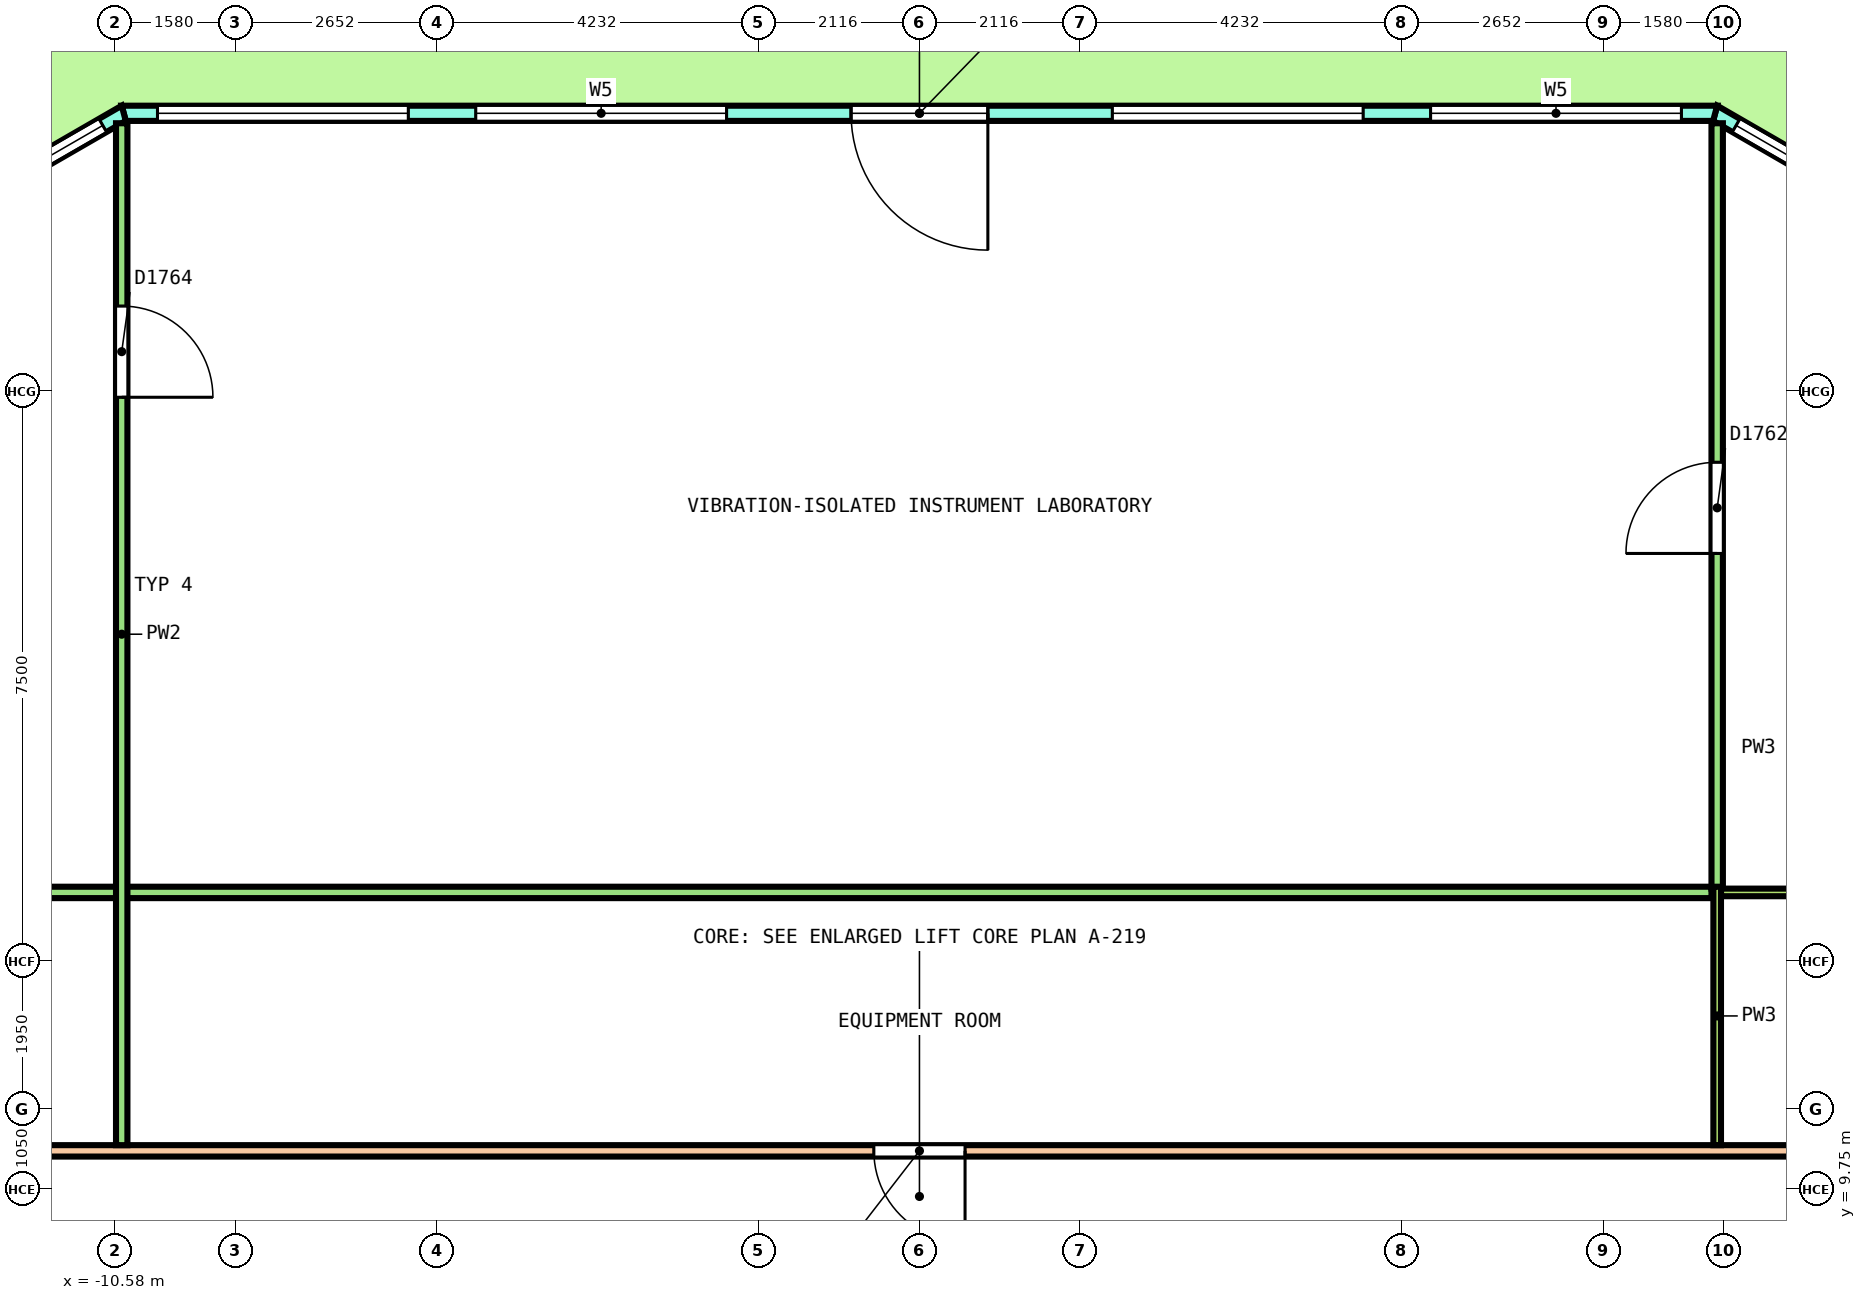
"""IFC4 building model, lengths in metres.
Left out: names, types, materials, properties, quantities, classifications, styles, units other than length and angle.
Written with IfcOpenShell. Run it as: python <this file> out.ifc"""

import sys

from ifc_helpers import new_model, si_unit, direction, frame, frame_2d, origin, place, context, subcontext, project, spatial, polyline, rectangle, outline, extrude, element, fill, save


model = new_model("IFC4")
c1 = context("Model", 3, precision=1e-05, world=origin(), true_north=direction((0.0, 1.0)))
c2 = subcontext(c1, "Body", "Model", "MODEL_VIEW")
j1 = project(units=[si_unit("LENGTHUNIT", "METRE"), si_unit("PLANEANGLEUNIT", "RADIAN")], contexts=[c1])
p1 = place(None, origin())
s1 = spatial("IfcSite", under=j1, at=p1, CompositionType="ELEMENT")
p2 = place(p1, origin())
s2 = spatial("IfcBuilding", under=s1, at=p2, CompositionType="ELEMENT")
p3 = place(p2, frame((0.0, 0.0, 162.8)))
s3 = spatial("IfcBuildingStorey", under=s2, at=p3, CompositionType="ELEMENT", Elevation=162.8)
p4 = place(p3, frame((16.422, 20.463, 0.0), z_axis=(0.0, 0.0, 1.0), x_axis=(-0.866029458321, 0.49999297727, 0.0)))
e1 = element("IfcWall", 1, at=p4, inside=s3, PredefinedType="SOLIDWALL", context=c2, shape_type="SweptSolid", body=[
    extrude(outline(polyline([(-0.027, -0.1), (1.128, -0.1), (2.282, -0.1), (3.437, -0.1), (4.592, -0.1), (5.747, -0.1), (6.901, -0.1), (6.848, 0.1), (5.711, 0.1), (4.574, 0.1), (3.437, 0.1), (2.301, 0.1), (1.164, 0.1), (0.027, 0.1), (-0.027, -0.1)])), origin(), (0.0, 0.0, 1.0), 4.1),
])
p5 = place(p4, frame((0.319, 0.0, 0.1)))
e2 = element("IfcOpeningElement", 2, at=p5, cuts=e1, PredefinedType="OPENING", context=c2, shape_type="SweptSolid", body=[
    extrude(rectangle(XDim=2.8, YDim=2.9, at=frame_2d((1.4, 1.45))), frame((0.0, 0.11, 0.0), z_axis=(0.0, -1.0, 0.0), x_axis=(1.0, 0.0, 0.0)), (0.0, 0.0, 1.0), 0.22),
])
p6 = place(p4, frame((3.756, 0.0, 0.1)))
e3 = element("IfcOpeningElement", 3, at=p6, cuts=e1, PredefinedType="OPENING", context=c2, shape_type="SweptSolid", body=[
    extrude(rectangle(XDim=2.8, YDim=2.9, at=frame_2d((1.4, 1.45))), frame((0.0, 0.11, 0.0), z_axis=(0.0, -1.0, 0.0), x_axis=(1.0, 0.0, 0.0)), (0.0, 0.0, 1.0), 0.22),
])
p7 = place(p3, frame((10.468, 23.9, 0.0), z_axis=(0.0, 0.0, 1.0), x_axis=(-1.0, 0.0, 0.0)))
e4 = element("IfcWall", 4, at=p7, inside=s3, PredefinedType="SOLIDWALL", context=c2, shape_type="SweptSolid", body=[
    extrude(outline(polyline([(-0.027, -0.1), (1.023, -0.1), (2.072, -0.1), (3.122, -0.1), (4.171, -0.1), (5.221, -0.1), (6.27, -0.1), (7.32, -0.1), (8.369, -0.1), (9.419, -0.1), (10.468, -0.1), (11.518, -0.1), (12.567, -0.1), (13.617, -0.1), (14.666, -0.1), (15.716, -0.1), (16.765, -0.1), (17.815, -0.1), (18.864, -0.1), (19.914, -0.1), (20.963, -0.1), (20.91, 0.1), (19.865, 0.1), (18.821, 0.1), (17.777, 0.1), (16.733, 0.1), (15.689, 0.1), (14.645, 0.1), (13.601, 0.1), (12.557, 0.1), (11.512, 0.1), (10.468, 0.1), (9.424, 0.1), (8.38, 0.1), (7.336, 0.1), (6.292, 0.1), (5.248, 0.1), (4.203, 0.1), (3.159, 0.1), (2.115, 0.1), (1.071, 0.1), (0.027, 0.1), (-0.027, -0.1)])), origin(), (0.0, 0.0, 1.0), 4.1),
])
p8 = place(p7, frame((0.444, 0.0, 0.1)))
e5 = element("IfcOpeningElement", 5, at=p8, cuts=e4, PredefinedType="OPENING", context=c2, shape_type="SweptSolid", body=[
    extrude(rectangle(XDim=3.3, YDim=2.9, at=frame_2d((1.65, 1.45))), frame((0.0, 0.11, 0.0), z_axis=(0.0, -1.0, 0.0), x_axis=(1.0, 0.0, 0.0)), (0.0, 0.0, 1.0), 0.22),
])
p9 = place(p7, frame((4.631, 0.0, 0.1)))
e6 = element("IfcOpeningElement", 6, at=p9, cuts=e4, PredefinedType="OPENING", context=c2, shape_type="SweptSolid", body=[
    extrude(rectangle(XDim=3.3, YDim=2.9, at=frame_2d((1.65, 1.45))), frame((0.0, 0.11, 0.0), z_axis=(0.0, -1.0, 0.0), x_axis=(1.0, 0.0, 0.0)), (0.0, 0.0, 1.0), 0.22),
])
p10 = place(p7, frame((9.568, 0.0, 0.0)))
e7 = element("IfcOpeningElement", 7, at=p10, cuts=e4, PredefinedType="OPENING", context=c2, shape_type="SweptSolid", body=[
    extrude(rectangle(XDim=1.8, YDim=2.4, at=frame_2d((0.9, 1.2))), frame((0.0, 0.11, 0.0), z_axis=(0.0, -1.0, 0.0), x_axis=(1.0, 0.0, 0.0)), (0.0, 0.0, 1.0), 0.22),
])
p11 = place(p7, frame((9.568, 0.0, 2.55)))
e8 = element("IfcOpeningElement", 8, at=p11, cuts=e4, PredefinedType="OPENING", context=c2, shape_type="SweptSolid", body=[
    extrude(rectangle(XDim=1.8, YDim=0.45, at=frame_2d((0.9, 0.225))), frame((0.0, 0.11, 0.0), z_axis=(0.0, -1.0, 0.0), x_axis=(1.0, 0.0, 0.0)), (0.0, 0.0, 1.0), 0.22),
])
p12 = place(p7, frame((13.006, 0.0, 0.1)))
e9 = element("IfcOpeningElement", 9, at=p12, cuts=e4, PredefinedType="OPENING", context=c2, shape_type="SweptSolid", body=[
    extrude(rectangle(XDim=3.3, YDim=2.9, at=frame_2d((1.65, 1.45))), frame((0.0, 0.11, 0.0), z_axis=(0.0, -1.0, 0.0), x_axis=(1.0, 0.0, 0.0)), (0.0, 0.0, 1.0), 0.22),
])
p13 = place(p7, frame((17.193, 0.0, 0.1)))
e10 = element("IfcOpeningElement", 10, at=p13, cuts=e4, PredefinedType="OPENING", context=c2, shape_type="SweptSolid", body=[
    extrude(rectangle(XDim=3.3, YDim=2.9, at=frame_2d((1.65, 1.45))), frame((0.0, 0.11, 0.0), z_axis=(0.0, -1.0, 0.0), x_axis=(1.0, 0.0, 0.0)), (0.0, 0.0, 1.0), 0.22),
])
p14 = place(p3, frame((-10.468, 23.9, 0.0), z_axis=(0.0, 0.0, 1.0), x_axis=(-0.866029458321, -0.49999297727, 0.0)))
e11 = element("IfcWall", 11, at=p14, inside=s3, PredefinedType="SOLIDWALL", context=c2, shape_type="SweptSolid", body=[
    extrude(outline(polyline([(-0.027, -0.1), (1.128, -0.1), (2.282, -0.1), (3.437, -0.1), (4.592, -0.1), (5.747, -0.1), (6.901, -0.1), (6.848, 0.1), (5.711, 0.1), (4.574, 0.1), (3.437, 0.1), (2.301, 0.1), (1.164, 0.1), (0.027, 0.1), (-0.027, -0.1)])), origin(), (0.0, 0.0, 1.0), 4.1),
])
p15 = place(p14, frame((0.319, 0.0, 0.1)))
e12 = element("IfcOpeningElement", 12, at=p15, cuts=e11, PredefinedType="OPENING", context=c2, shape_type="SweptSolid", body=[
    extrude(rectangle(XDim=2.8, YDim=2.9, at=frame_2d((1.4, 1.45))), frame((0.0, 0.11, 0.0), z_axis=(0.0, -1.0, 0.0), x_axis=(1.0, 0.0, 0.0)), (0.0, 0.0, 1.0), 0.22),
])
p16 = place(p14, frame((3.756, 0.0, 0.1)))
e13 = element("IfcOpeningElement", 13, at=p16, cuts=e11, PredefinedType="OPENING", context=c2, shape_type="SweptSolid", body=[
    extrude(rectangle(XDim=2.8, YDim=2.9, at=frame_2d((1.4, 1.45))), frame((0.0, 0.11, 0.0), z_axis=(0.0, -1.0, 0.0), x_axis=(1.0, 0.0, 0.0)), (0.0, 0.0, 1.0), 0.22),
])
p17 = place(p3, frame((-15.275, 10.25, 0.0), z_axis=(0.0, 0.0, 1.0), x_axis=(1.0, 0.0, 0.0)))
e14 = element("IfcWall", 14, at=p17, inside=s3, PredefinedType="PARTITIONING", context=c2, shape_type="SweptSolid", body=[
    extrude(rectangle(XDim=30.55, YDim=0.15, at=frame_2d((15.275, 0.0))), origin(), (0.0, 0.0, 1.0), 3.05),
])
p18 = place(p17, frame((26.909, 0.0, 0.0)))
e15 = element("IfcOpeningElement", 15, at=p18, cuts=e14, PredefinedType="OPENING", context=c2, shape_type="SweptSolid", body=[
    extrude(rectangle(XDim=1.0, YDim=2.1, at=frame_2d((0.5, 1.05))), frame((0.0, 0.085, 0.0), z_axis=(0.0, -1.0, 0.0), x_axis=(1.0, 0.0, 0.0)), (0.0, 0.0, 1.0), 0.17),
])
p19 = place(p17, frame((14.675, 0.0, 0.0)))
e16 = element("IfcOpeningElement", 16, at=p19, cuts=e14, PredefinedType="OPENING", context=c2, shape_type="SweptSolid", body=[
    extrude(rectangle(XDim=1.2, YDim=2.1, at=frame_2d((0.6, 1.05))), frame((0.0, 0.085, 0.0), z_axis=(0.0, -1.0, 0.0), x_axis=(1.0, 0.0, 0.0)), (0.0, 0.0, 1.0), 0.17),
])
p20 = place(p17, frame((2.326, 0.0, 0.0)))
e17 = element("IfcOpeningElement", 17, at=p20, cuts=e14, PredefinedType="OPENING", context=c2, shape_type="SweptSolid", body=[
    extrude(rectangle(XDim=1.0, YDim=2.1, at=frame_2d((0.5, 1.05))), frame((0.0, 0.085, 0.0), z_axis=(0.0, -1.0, 0.0), x_axis=(1.0, 0.0, 0.0)), (0.0, 0.0, 1.0), 0.17),
])
p21 = place(p3, frame((-16.761, 13.65, 0.0), z_axis=(0.0, 0.0, 1.0), x_axis=(1.0, 0.0, 0.0)))
e18 = element("IfcWall", 18, at=p21, inside=s3, PredefinedType="PARTITIONING", context=c2, shape_type="SweptSolid", body=[
    extrude(rectangle(XDim=27.182, YDim=0.15, at=frame_2d((13.591, 0.0))), origin(), (0.0, 0.0, 1.0), 3.05),
])
p22 = place(p3, frame((10.495, 13.7, 0.0), z_axis=(0.0, 0.0, 1.0), x_axis=(0.0, 1.0, 0.0)))
e19 = element("IfcWall", 19, at=p22, inside=s3, PredefinedType="PARTITIONING", context=c2, shape_type="SweptSolid", body=[
    extrude(rectangle(XDim=10.069, YDim=0.15, at=frame_2d((5.035, 0.0))), origin(), (0.0, 0.0, 1.0), 3.05),
])
p23 = place(p22, frame((4.409, 0.0, 0.0)))
e20 = element("IfcOpeningElement", 20, at=p23, cuts=e19, PredefinedType="OPENING", context=c2, shape_type="SweptSolid", body=[
    extrude(rectangle(XDim=1.2, YDim=2.1, at=frame_2d((0.6, 1.05))), frame((0.0, 0.085, 0.0), z_axis=(0.0, -1.0, 0.0), x_axis=(1.0, 0.0, 0.0)), (0.0, 0.0, 1.0), 0.17),
])
p24 = place(p3, frame((-10.495, 10.325, 0.0), z_axis=(0.0, 0.0, 1.0), x_axis=(0.0, 1.0, 0.0)))
e21 = element("IfcWall", 21, at=p24, inside=s3, PredefinedType="PARTITIONING", context=c2, shape_type="SweptSolid", body=[
    extrude(rectangle(XDim=13.444, YDim=0.15, at=frame_2d((6.722, 0.0))), origin(), (0.0, 0.0, 1.0), 3.05),
])
p25 = place(p24, frame((9.839, 0.0, 0.0)))
e22 = element("IfcOpeningElement", 22, at=p25, cuts=e21, PredefinedType="OPENING", context=c2, shape_type="SweptSolid", body=[
    extrude(rectangle(XDim=1.2, YDim=2.1, at=frame_2d((0.6, 1.05))), frame((0.0, 0.085, 0.0), z_axis=(0.0, -1.0, 0.0), x_axis=(1.0, 0.0, 0.0)), (0.0, 0.0, 1.0), 0.17),
])
p26 = place(p3, frame((10.545, 13.65, 0.0), z_axis=(0.0, 0.0, 1.0), x_axis=(1.0, 0.0, 0.0)))
e23 = element("IfcWall", 23, at=p26, inside=s3, PredefinedType="PARTITIONING", context=c2, shape_type="SweptSolid", body=[
    extrude(rectangle(XDim=5.108, YDim=0.1, at=frame_2d((2.554, 0.0))), origin(), (0.0, 0.0, 1.0), 3.05),
])
p27 = place(p26, frame((2.597, 0.0, 0.0)))
e24 = element("IfcOpeningElement", 24, at=p27, cuts=e23, PredefinedType="OPENING", context=c2, shape_type="SweptSolid", body=[
    extrude(rectangle(XDim=1.0, YDim=2.1, at=frame_2d((0.5, 1.05))), frame((0.0, 0.06, 0.0), z_axis=(0.0, -1.0, 0.0), x_axis=(1.0, 0.0, 0.0)), (0.0, 0.0, 1.0), 0.12),
])
p28 = place(p3, frame((10.495, 10.325, 0.0), z_axis=(0.0, 0.0, 1.0), x_axis=(0.0, 1.0, 0.0)))
e25 = element("IfcWall", 25, at=p28, inside=s3, PredefinedType="PARTITIONING", context=c2, shape_type="SweptSolid", body=[
    extrude(rectangle(XDim=3.4, YDim=0.1, at=frame_2d((1.7, 0.0))), origin(), (0.0, 0.0, 1.0), 3.05),
])
p29 = place(p6, origin())
e26 = element("IfcWindow", 26, at=p29, inside=s3, PartitioningType="SINGLE_PANEL", PredefinedType="WINDOW", context=c2, shape_type="SweptSolid", body=[
    extrude(rectangle(XDim=2.8, YDim=2.9, at=frame_2d((1.4, 1.45))), frame((0.0, 0.03, 0.0), z_axis=(0.0, -1.0, 0.0), x_axis=(1.0, 0.0, 0.0)), (0.0, 0.0, 1.0), 0.06),
])
fill(e3, e26)
p30 = place(p8, origin())
e27 = element("IfcWindow", 27, at=p30, inside=s3, PartitioningType="SINGLE_PANEL", PredefinedType="WINDOW", context=c2, shape_type="SweptSolid", body=[
    extrude(rectangle(XDim=3.3, YDim=2.9, at=frame_2d((1.65, 1.45))), frame((0.0, 0.03, 0.0), z_axis=(0.0, -1.0, 0.0), x_axis=(1.0, 0.0, 0.0)), (0.0, 0.0, 1.0), 0.06),
])
fill(e5, e27)
p31 = place(p9, origin())
e28 = element("IfcWindow", 28, at=p31, inside=s3, PartitioningType="SINGLE_PANEL", PredefinedType="WINDOW", context=c2, shape_type="SweptSolid", body=[
    extrude(rectangle(XDim=3.3, YDim=2.9, at=frame_2d((1.65, 1.45))), frame((0.0, 0.03, 0.0), z_axis=(0.0, -1.0, 0.0), x_axis=(1.0, 0.0, 0.0)), (0.0, 0.0, 1.0), 0.06),
])
fill(e6, e28)
p32 = place(p10, origin())
e29 = element("IfcDoor", 29, at=p32, inside=s3, OperationType="DOUBLE_DOOR_SINGLE_SWING", PredefinedType="DOOR", context=c2, shape_type="SweptSolid", body=[
    extrude(rectangle(XDim=1.8, YDim=2.4, at=frame_2d((0.9, 1.2))), frame((0.0, 0.025, 0.0), z_axis=(0.0, -1.0, 0.0), x_axis=(1.0, 0.0, 0.0)), (0.0, 0.0, 1.0), 0.05),
])
fill(e7, e29)
p33 = place(p11, origin())
e30 = element("IfcWindow", 30, at=p33, inside=s3, PartitioningType="SINGLE_PANEL", PredefinedType="WINDOW", context=c2, shape_type="SweptSolid", body=[
    extrude(rectangle(XDim=1.8, YDim=0.45, at=frame_2d((0.9, 0.225))), frame((0.0, 0.03, 0.0), z_axis=(0.0, -1.0, 0.0), x_axis=(1.0, 0.0, 0.0)), (0.0, 0.0, 1.0), 0.06),
])
fill(e8, e30)
p34 = place(p12, origin())
e31 = element("IfcWindow", 31, at=p34, inside=s3, PartitioningType="SINGLE_PANEL", PredefinedType="WINDOW", context=c2, shape_type="SweptSolid", body=[
    extrude(rectangle(XDim=3.3, YDim=2.9, at=frame_2d((1.65, 1.45))), frame((0.0, 0.03, 0.0), z_axis=(0.0, -1.0, 0.0), x_axis=(1.0, 0.0, 0.0)), (0.0, 0.0, 1.0), 0.06),
])
fill(e9, e31)
p35 = place(p13, origin())
e32 = element("IfcWindow", 32, at=p35, inside=s3, PartitioningType="SINGLE_PANEL", PredefinedType="WINDOW", context=c2, shape_type="SweptSolid", body=[
    extrude(rectangle(XDim=3.3, YDim=2.9, at=frame_2d((1.65, 1.45))), frame((0.0, 0.03, 0.0), z_axis=(0.0, -1.0, 0.0), x_axis=(1.0, 0.0, 0.0)), (0.0, 0.0, 1.0), 0.06),
])
fill(e10, e32)
p36 = place(p15, origin())
e33 = element("IfcWindow", 33, at=p36, inside=s3, PartitioningType="SINGLE_PANEL", PredefinedType="WINDOW", context=c2, shape_type="SweptSolid", body=[
    extrude(rectangle(XDim=2.8, YDim=2.9, at=frame_2d((1.4, 1.45))), frame((0.0, 0.03, 0.0), z_axis=(0.0, -1.0, 0.0), x_axis=(1.0, 0.0, 0.0)), (0.0, 0.0, 1.0), 0.06),
])
fill(e12, e33)
p37 = place(p23, origin())
e34 = element("IfcDoor", 34, at=p37, inside=s3, OperationType="DOUBLE_DOOR_SINGLE_SWING", PredefinedType="DOOR", context=c2, shape_type="SweptSolid", body=[
    extrude(rectangle(XDim=1.2, YDim=2.1, at=frame_2d((0.6, 1.05))), frame((0.0, 0.025, 0.0), z_axis=(0.0, -1.0, 0.0), x_axis=(1.0, 0.0, 0.0)), (0.0, 0.0, 1.0), 0.05),
])
fill(e20, e34)
p38 = place(p19, origin())
e35 = element("IfcDoor", 35, at=p38, inside=s3, OperationType="DOUBLE_DOOR_SINGLE_SWING", PredefinedType="DOOR", context=c2, shape_type="SweptSolid", body=[
    extrude(rectangle(XDim=1.2, YDim=2.1, at=frame_2d((0.6, 1.05))), frame((0.0, 0.025, 0.0), z_axis=(0.0, -1.0, 0.0), x_axis=(1.0, 0.0, 0.0)), (0.0, 0.0, 1.0), 0.05),
])
fill(e16, e35)
p39 = place(p25, origin())
e36 = element("IfcDoor", 36, at=p39, inside=s3, OperationType="DOUBLE_DOOR_SINGLE_SWING", PredefinedType="DOOR", context=c2, shape_type="SweptSolid", body=[
    extrude(rectangle(XDim=1.2, YDim=2.1, at=frame_2d((0.6, 1.05))), frame((0.0, 0.025, 0.0), z_axis=(0.0, -1.0, 0.0), x_axis=(1.0, 0.0, 0.0)), (0.0, 0.0, 1.0), 0.05),
])
fill(e22, e36)
save(model, sys.argv[1])
